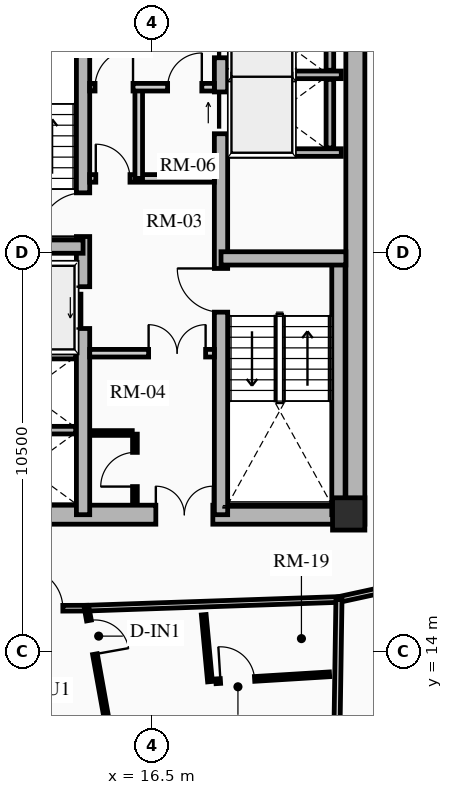
"""IFC4 building model, lengths in metres.
Left out: names, types, materials, properties, quantities, classifications, styles, units other than length and angle.
Written with IfcOpenShell. Run it as: python <this file> out.ifc"""

import sys

from ifc_helpers import new_model, si_unit, direction, frame, frame_2d, origin, origin_2d, place, context, subcontext, project, spatial, rectangle, extrude, source, transform, mapped, element, fill, save


model = new_model("IFC4")
c1 = context("Model", 3, precision=1e-05, world=origin(), true_north=direction((0.0, 1.0)))
c2 = subcontext(c1, "Body", "Model", "MODEL_VIEW")
j1 = project(units=[si_unit("LENGTHUNIT", "METRE"), si_unit("PLANEANGLEUNIT", "RADIAN")], contexts=[c1])
p1 = place(None, origin())
s1 = spatial("IfcSite", under=j1, at=p1, CompositionType="ELEMENT")
p2 = place(p1, origin())
s2 = spatial("IfcBuilding", under=s1, at=p2, CompositionType="ELEMENT")
p3 = place(p2, frame((0.0, 0.0, 42.37)))
s3 = spatial("IfcBuildingStorey", under=s2, at=p3, CompositionType="ELEMENT", Elevation=42.37)
p4 = place(p3, frame((21.85, 17.35, 0.0), z_axis=(0.0, 0.0, 1.0), x_axis=(0.0, 1.0, 0.0)))
e1 = element("IfcWall", 1, at=p4, inside=s3, PredefinedType="SHEAR", context=c2, shape_type="SweptSolid", body=[
    extrude(rectangle(XDim=14.3, YDim=0.5, at=frame_2d((7.15, 0.0))), origin(), (0.0, 0.0, 1.0), 2.91),
])
p5 = place(p3, frame((11.15, 17.6, 0.0), z_axis=(0.0, 0.0, 1.0), x_axis=(1.0, 0.0, 0.0)))
e2 = element("IfcWall", 2, at=p5, inside=s3, PredefinedType="SHEAR", context=c2, shape_type="SweptSolid", body=[
    extrude(rectangle(XDim=10.7, YDim=0.5, at=frame_2d((5.35, 0.0))), origin(), (0.0, 0.0, 1.0), 2.91),
])
m1 = source(origin(), c2, "Body", "SweptSolid", [
    extrude(rectangle(XDim=1.5, YDim=2.02, at=frame_2d((0.75, 1.01))), frame((0.0, 0.26, 0.0), z_axis=(0.0, -1.0, 0.0), x_axis=(1.0, 0.0, 0.0)), (0.0, 0.0, 1.0), 0.52),
])
p6 = place(p5, frame((5.45, 0.0, 0.0)))
e3 = element("IfcOpeningElement", 3, at=p6, cuts=e2, PredefinedType="OPENING", context=c2, shape_type="MappedRepresentation", body=[
    mapped(m1, transform((0.0, 0.0, 0.0), x_axis=(1.0, 0.0, 0.0), y_axis=(0.0, 1.0, 0.0), z_axis=(0.0, 0.0, 1.0), scale=1.0)),
])
p7 = place(p3, frame((14.685, 17.6, 0.0), z_axis=(0.0, 0.0, 1.0), x_axis=(0.0, 1.0, 0.0)))
e4 = element("IfcWall", 4, at=p7, inside=s3, PredefinedType="SHEAR", context=c2, shape_type="SweptSolid", body=[
    extrude(rectangle(XDim=13.8, YDim=0.35, at=frame_2d((6.9, 0.0))), origin(), (0.0, 0.0, 1.0), 2.91),
])
m2 = source(origin(), c2, "Body", "SweptSolid", [
    extrude(rectangle(XDim=1.1, YDim=2.015, at=frame_2d((0.55, 1.007))), frame((0.0, 0.185, 0.0), z_axis=(0.0, -1.0, 0.0), x_axis=(1.0, 0.0, 0.0)), (0.0, 0.0, 1.0), 0.37),
])
p8 = place(p7, frame((4.9, 0.0, 0.0)))
e5 = element("IfcOpeningElement", 5, at=p8, cuts=e4, PredefinedType="OPENING", context=c2, shape_type="MappedRepresentation", body=[
    mapped(m2, transform((0.0, 0.0, 0.0), x_axis=(1.0, 0.0, 0.0), y_axis=(0.0, 1.0, 0.0), z_axis=(0.0, 0.0, 1.0), scale=1.0)),
])
m3 = source(origin(), c2, "Body", "SweptSolid", [
    extrude(rectangle(XDim=1.15, YDim=2.02, at=frame_2d((0.575, 1.01))), frame((0.0, 0.185, 0.0), z_axis=(0.0, -1.0, 0.0), x_axis=(1.0, 0.0, 0.0)), (0.0, 0.0, 1.0), 0.37),
])
p9 = place(p7, frame((7.32, 0.0, 0.0)))
e6 = element("IfcOpeningElement", 6, at=p9, cuts=e4, PredefinedType="OPENING", context=c2, shape_type="MappedRepresentation", body=[
    mapped(m3, transform((0.0, 0.0, 0.0), x_axis=(1.0, 0.0, 0.0), y_axis=(0.0, 1.0, 0.0), z_axis=(0.0, 0.0, 1.0), scale=1.0)),
])
p10 = place(p3, frame((18.315, 17.6, 0.0), z_axis=(0.0, 0.0, 1.0), x_axis=(0.0, 1.0, 0.0)))
e7 = element("IfcWall", 7, at=p10, inside=s3, PredefinedType="SHEAR", context=c2, shape_type="SweptSolid", body=[
    extrude(rectangle(XDim=13.8, YDim=0.35, at=frame_2d((6.9, 0.0))), origin(), (0.0, 0.0, 1.0), 2.91),
])
p11 = place(p10, frame((10.025, 0.0, 0.0)))
e8 = element("IfcOpeningElement", 8, at=p11, cuts=e7, PredefinedType="OPENING", context=c2, shape_type="MappedRepresentation", body=[
    mapped(m2, transform((0.0, 0.0, 0.0), x_axis=(1.0, 0.0, 0.0), y_axis=(0.0, 1.0, 0.0), z_axis=(0.0, 0.0, 1.0), scale=1.0)),
])
p12 = place(p10, frame((12.025, 0.0, 0.0)))
e9 = element("IfcOpeningElement", 9, at=p12, cuts=e7, PredefinedType="OPENING", context=c2, shape_type="MappedRepresentation", body=[
    mapped(m2, transform((0.0, 0.0, 0.0), x_axis=(1.0, 0.0, 0.0), y_axis=(0.0, 1.0, 0.0), z_axis=(0.0, 0.0, 1.0), scale=1.0)),
])
p13 = place(p10, frame((5.33, 0.0, 0.0)))
e10 = element("IfcOpeningElement", 10, at=p13, cuts=e7, PredefinedType="OPENING", context=c2, shape_type="MappedRepresentation", body=[
    mapped(m3, transform((0.0, 0.0, 0.0), x_axis=(1.0, 0.0, 0.0), y_axis=(0.0, 1.0, 0.0), z_axis=(0.0, 0.0, 1.0), scale=1.0)),
])
p14 = place(p3, frame((11.4, 24.655, 0.0), z_axis=(0.0, 0.0, 1.0), x_axis=(1.0, 0.0, 0.0)))
e11 = element("IfcWall", 11, at=p14, inside=s3, PredefinedType="SHEAR", context=c2, shape_type="SweptSolid", body=[
    extrude(rectangle(XDim=3.285, YDim=0.35, at=frame_2d((1.643, 0.0))), origin(), (0.0, 0.0, 1.0), 2.91),
])
p15 = place(p3, frame((21.405, 17.6, 0.0), z_axis=(0.0, 0.0, 1.0), x_axis=(0.0, 1.0, 0.0)))
e12 = element("IfcWall", 12, at=p15, inside=s3, PredefinedType="SHEAR", context=c2, shape_type="SweptSolid", body=[
    extrude(rectangle(XDim=6.745, YDim=0.35, at=frame_2d((3.373, 0.0))), origin(), (0.0, 0.0, 1.0), 2.91),
])
p16 = place(p3, frame((18.315, 24.345, 0.0), z_axis=(0.0, 0.0, 1.0), x_axis=(1.0, 0.0, 0.0)))
e13 = element("IfcWall", 13, at=p16, inside=s3, PredefinedType="SHEAR", context=c2, shape_type="SweptSolid", body=[
    extrude(rectangle(XDim=3.285, YDim=0.35, at=frame_2d((1.643, 0.0))), origin(), (0.0, 0.0, 1.0), 2.91),
])
p17 = place(p3, frame((21.675, 17.62, 0.0), z_axis=(0.0, 0.0, 1.0), x_axis=(1.0, 0.0, 0.0)))
e14 = element("IfcColumn", 14, at=p17, inside=s3, PredefinedType="COLUMN", context=c2, shape_type="SweptSolid", body=[
    extrude(rectangle(XDim=0.85, YDim=0.85, at=origin_2d()), origin(), (0.0, 0.0, 1.0), 2.91),
])
for number, where, z_axis, x_axis in (
    (15, (11.52, 21.8, 0.0), (0.0, 0.0, 1.0), (1.0, 0.0, 0.0)),
    (16, (11.52, 19.825, 0.0), (0.0, 0.0, 1.0), (1.0, 0.0, 0.0)),
    (17, (18.51, 27.13, 0.0), (0.0, 0.0, 1.0), (1.0, 0.0, 0.0)),
    (18, (18.51, 29.175, 0.0), (0.0, 0.0, 1.0), (1.0, 0.0, 0.0)),
):
    element("IfcWall", number, at=place(p3, frame(where, z_axis=z_axis, x_axis=x_axis)), inside=s3, PredefinedType="SHEAR", context=c2, shape_type="SweptSolid", body=[
        extrude(rectangle(XDim=2.97, YDim=0.2, at=frame_2d((1.485, 0.0))), origin(), (0.0, 0.0, 1.0), 2.91),
    ])
p18 = place(p3, frame((21.18, 27.25, 0.0), z_axis=(0.0, 0.0, 1.0), x_axis=(0.0, 1.0, 0.0)))
e19 = element("IfcWall", 19, at=p18, inside=s3, PredefinedType="SHEAR", context=c2, shape_type="SweptSolid", body=[
    extrude(rectangle(XDim=1.805, YDim=0.2, at=frame_2d((0.902, 0.0))), origin(), (0.0, 0.0, 1.0), 2.91),
])
p19 = place(p3, frame((21.18, 29.295, 0.0), z_axis=(0.0, 0.0, 1.0), x_axis=(0.0, 1.0, 0.0)))
e20 = element("IfcWall", 20, at=p19, inside=s3, PredefinedType="SHEAR", context=c2, shape_type="SweptSolid", body=[
    extrude(rectangle(XDim=1.635, YDim=0.2, at=frame_2d((0.817, 0.0))), origin(), (0.0, 0.0, 1.0), 2.91),
])
p20 = place(p3, frame((14.86, 21.85, 0.0), z_axis=(0.0, 0.0, 1.0), x_axis=(1.0, 0.0, 0.0)))
e21 = element("IfcWall", 21, at=p20, inside=s3, PredefinedType="PARTITIONING", context=c2, shape_type="SweptSolid", body=[
    extrude(rectangle(XDim=3.28, YDim=0.2, at=frame_2d((1.64, 0.0))), origin(), (0.0, 0.0, 1.0), 2.635),
])
m4 = source(origin(), c2, "Body", "SweptSolid", [
    extrude(rectangle(XDim=1.5, YDim=2.02, at=frame_2d((0.75, 1.01))), frame((0.0, 0.11, 0.0), z_axis=(0.0, -1.0, 0.0), x_axis=(1.0, 0.0, 0.0)), (0.0, 0.0, 1.0), 0.22),
])
p21 = place(p20, frame((1.55, 0.0, 0.0)))
e22 = element("IfcOpeningElement", 22, at=p21, cuts=e21, PredefinedType="OPENING", context=c2, shape_type="MappedRepresentation", body=[
    mapped(m4, transform((0.0, 0.0, 0.0), x_axis=(1.0, 0.0, 0.0), y_axis=(0.0, 1.0, 0.0), z_axis=(0.0, 0.0, 1.0), scale=1.0)),
])
p22 = place(p3, frame((14.86, 26.45, 0.0), z_axis=(0.0, 0.0, 1.0), x_axis=(1.0, 0.0, 0.0)))
e23 = element("IfcWall", 23, at=p22, inside=s3, PredefinedType="PARTITIONING", context=c2, shape_type="SweptSolid", body=[
    extrude(rectangle(XDim=3.28, YDim=0.2, at=frame_2d((1.64, 0.0))), origin(), (0.0, 0.0, 1.0), 2.635),
])
m5 = source(origin(), c2, "Body", "SweptSolid", [
    extrude(rectangle(XDim=0.9, YDim=2.005, at=frame_2d((0.45, 1.002))), frame((0.0, 0.11, 0.0), z_axis=(0.0, -1.0, 0.0), x_axis=(1.0, 0.0, 0.0)), (0.0, 0.0, 1.0), 0.22),
])
p23 = place(p22, frame((0.16, 0.0, 0.0)))
e24 = element("IfcOpeningElement", 24, at=p23, cuts=e23, PredefinedType="OPENING", context=c2, shape_type="MappedRepresentation", body=[
    mapped(m5, transform((0.0, 0.0, 0.0), x_axis=(1.0, 0.0, 0.0), y_axis=(0.0, 1.0, 0.0), z_axis=(0.0, 0.0, 1.0), scale=1.0)),
])
p24 = place(p3, frame((16.15, 26.45, 0.0), z_axis=(0.0, 0.0, 1.0), x_axis=(0.0, 1.0, 0.0)))
e25 = element("IfcWall", 25, at=p24, inside=s3, PredefinedType="PARTITIONING", context=c2, shape_type="SweptSolid", body=[
    extrude(rectangle(XDim=2.4, YDim=0.2, at=frame_2d((1.2, 0.0))), origin(), (0.0, 0.0, 1.0), 2.635),
])
p25 = place(p3, frame((14.86, 28.85, 0.0), z_axis=(0.0, 0.0, 1.0), x_axis=(1.0, 0.0, 0.0)))
e26 = element("IfcWall", 26, at=p25, inside=s3, PredefinedType="PARTITIONING", context=c2, shape_type="SweptSolid", body=[
    extrude(rectangle(XDim=3.28, YDim=0.2, at=frame_2d((1.64, 0.0))), origin(), (0.0, 0.0, 1.0), 2.635),
])
m6 = source(origin(), c2, "Body", "SweptSolid", [
    extrude(rectangle(XDim=1.0, YDim=2.015, at=frame_2d((0.5, 1.007))), frame((0.0, 0.11, 0.0), z_axis=(0.0, -1.0, 0.0), x_axis=(1.0, 0.0, 0.0)), (0.0, 0.0, 1.0), 0.22),
])
p26 = place(p25, frame((0.14, 0.0, 0.0)))
e27 = element("IfcOpeningElement", 27, at=p26, cuts=e26, PredefinedType="OPENING", context=c2, shape_type="MappedRepresentation", body=[
    mapped(m6, transform((0.0, 0.0, 0.0), x_axis=(1.0, 0.0, 0.0), y_axis=(0.0, 1.0, 0.0), z_axis=(0.0, 0.0, 1.0), scale=1.0)),
])
p27 = place(p25, frame((2.05, 0.0, 0.0)))
e28 = element("IfcOpeningElement", 28, at=p27, cuts=e26, PredefinedType="OPENING", context=c2, shape_type="MappedRepresentation", body=[
    mapped(m5, transform((0.0, 0.0, 0.0), x_axis=(1.0, 0.0, 0.0), y_axis=(0.0, 1.0, 0.0), z_axis=(0.0, 0.0, 1.0), scale=1.0)),
])
p28 = place(p3, frame((16.05, 17.92, 0.0), z_axis=(0.0, 0.0, 1.0), x_axis=(0.0, 1.0, 0.0)))
e29 = element("IfcWall", 29, at=p28, inside=s3, PredefinedType="PARTITIONING", context=c2, shape_type="SweptSolid", body=[
    extrude(rectangle(XDim=1.8, YDim=0.125, at=frame_2d((0.9, 0.0))), origin(), (0.0, 0.0, 1.0), 2.635),
])
m7 = source(origin(), c2, "Body", "SweptSolid", [
    extrude(rectangle(XDim=0.9, YDim=2.005, at=frame_2d((0.45, 1.002))), frame((0.0, 0.073, 0.0), z_axis=(0.0, -1.0, 0.0), x_axis=(1.0, 0.0, 0.0)), (0.0, 0.0, 1.0), 0.145),
])
p29 = place(p28, frame((0.42, 0.0, 0.0)))
e30 = element("IfcOpeningElement", 30, at=p29, cuts=e29, PredefinedType="OPENING", context=c2, shape_type="MappedRepresentation", body=[
    mapped(m7, transform((0.0, 0.0, 0.0), x_axis=(1.0, 0.0, 0.0), y_axis=(0.0, 1.0, 0.0), z_axis=(0.0, 0.0, 1.0), scale=1.0)),
])
p30 = place(p3, frame((14.88, 19.75, 0.0), z_axis=(0.0, 0.0, 1.0), x_axis=(1.0, 0.0, 0.0)))
e31 = element("IfcWall", 31, at=p30, inside=s3, PredefinedType="PARTITIONING", context=c2, shape_type="SweptSolid", body=[
    extrude(rectangle(XDim=1.1, YDim=0.125, at=frame_2d((0.55, 0.0))), origin(), (0.0, 0.0, 1.0), 2.635),
])
p31 = place(p3, frame((11.46, 15.129, 0.0), z_axis=(0.0, 0.0, 1.0), x_axis=(0.999993513287, 0.003601858435, 0.0)))
e32 = element("IfcWall", 32, at=p31, inside=s3, PredefinedType="PARTITIONING", context=c2, shape_type="SweptSolid", body=[
    extrude(rectangle(XDim=3.321, YDim=0.15, at=frame_2d((1.661, 0.0))), origin(), (0.0, 0.0, 1.0), 2.159),
])
m8 = source(origin(), c2, "Body", "SweptSolid", [
    extrude(rectangle(XDim=1.05, YDim=2.015, at=frame_2d((0.525, 1.007))), frame((0.0, 0.085, 0.0), z_axis=(0.0, -1.0, 0.0), x_axis=(1.0, 0.0, 0.0)), (0.0, 0.0, 1.0), 0.17),
])
p32 = place(p31, frame((1.643, 0.0, 0.0)))
e33 = element("IfcOpeningElement", 33, at=p32, cuts=e32, PredefinedType="OPENING", context=c2, shape_type="MappedRepresentation", body=[
    mapped(m8, transform((0.0, 0.0, 0.0), x_axis=(1.0, 0.0, 0.0), y_axis=(0.0, 1.0, 0.0), z_axis=(0.0, 0.0, 1.0), scale=1.0)),
])
p33 = place(p3, frame((14.781, 15.141, 0.0), z_axis=(0.0, 0.0, 1.0), x_axis=(0.999407918707, 0.034406569513, 0.0)))
e34 = element("IfcWall", 34, at=p33, inside=s3, PredefinedType="PARTITIONING", context=c2, shape_type="SweptSolid", body=[
    extrude(rectangle(XDim=6.642, YDim=0.15, at=frame_2d((3.321, 0.0))), origin(), (0.0, 0.0, 1.0), 2.159),
])
p34 = place(p3, frame((21.419, 15.369, 0.0), z_axis=(0.0, 0.0, 1.0), x_axis=(0.977192701953, 0.212354475464, 0.0)))
e35 = element("IfcWall", 35, at=p34, inside=s3, PredefinedType="PARTITIONING", context=c2, shape_type="SweptSolid", body=[
    extrude(rectangle(XDim=1.888, YDim=0.15, at=frame_2d((0.944, 0.0))), origin(), (0.0, 0.0, 1.0), 2.205),
])
p35 = place(p3, frame((21.419, 15.369, 0.0), z_axis=(0.0, 0.0, 1.0), x_axis=(-0.015237110632, -0.999883908491, 0.0)))
e36 = element("IfcWall", 36, at=p35, inside=s3, PredefinedType="PARTITIONING", context=c2, shape_type="SweptSolid", body=[
    extrude(rectangle(XDim=8.893, YDim=0.16, at=frame_2d((4.446, 0.0))), origin(), (0.0, 0.0, 1.0), 2.073),
])
p36 = place(p3, frame((14.781, 15.141, 0.0), z_axis=(0.0, 0.0, 1.0), x_axis=(0.176426287524, -0.984313854962, 0.0)))
e37 = element("IfcWall", 37, at=p36, inside=s3, PredefinedType="PARTITIONING", context=c2, shape_type="SweptSolid", body=[
    extrude(rectangle(XDim=9.743, YDim=0.125, at=frame_2d((4.872, 0.0))), origin(), (0.0, 0.0, 1.0), 2.073),
])
p37 = place(p36, frame((0.33, 0.0, 0.0)))
e38 = element("IfcOpeningElement", 38, at=p37, cuts=e37, PredefinedType="OPENING", context=c2, shape_type="MappedRepresentation", body=[
    mapped(m7, transform((0.0, 0.0, 0.0), x_axis=(1.0, 0.0, 0.0), y_axis=(0.0, 1.0, 0.0), z_axis=(0.0, 0.0, 1.0), scale=1.0)),
])
p38 = place(p3, frame((17.86, 14.968, 0.0), z_axis=(0.0, 0.0, 1.0), x_axis=(0.093037102593, -0.995662642435, 0.0)))
e39 = element("IfcWall", 39, at=p38, inside=s3, PredefinedType="PARTITIONING", context=c2, shape_type="SweptSolid", body=[
    extrude(rectangle(XDim=1.769, YDim=0.125, at=frame_2d((0.884, 0.0))), origin(), (0.0, 0.0, 1.0), 2.635),
])
p39 = place(p3, frame((18.181, 13.216, 0.0), z_axis=(0.0, 0.0, 1.0), x_axis=(0.998120468621, 0.061282380177, 0.0)))
e40 = element("IfcWall", 40, at=p39, inside=s3, PredefinedType="PARTITIONING", context=c2, shape_type="SweptSolid", body=[
    extrude(rectangle(XDim=2.996, YDim=0.125, at=frame_2d((1.498, 0.0))), origin(), (0.0, 0.0, 1.0), 2.159),
])
p40 = place(p39, frame((0.12, 0.0, 0.0)))
e41 = element("IfcOpeningElement", 41, at=p40, cuts=e40, PredefinedType="OPENING", context=c2, shape_type="MappedRepresentation", body=[
    mapped(m7, transform((0.0, 0.0, 0.0), x_axis=(1.0, 0.0, 0.0), y_axis=(0.0, 1.0, 0.0), z_axis=(0.0, 0.0, 1.0), scale=1.0)),
])
m9 = source(origin(), c2, "Body", "SweptSolid", [
    extrude(rectangle(XDim=1.1, YDim=2.015, at=frame_2d((0.55, 1.007))), frame((0.0, 0.025, 0.0), z_axis=(0.0, -1.0, 0.0), x_axis=(1.0, 0.0, 0.0)), (0.0, 0.0, 1.0), 0.05),
])
p41 = place(p8, origin())
e42 = element("IfcDoor", 42, at=p41, inside=s3, OperationType="SLIDING_TO_LEFT", PredefinedType="DOOR", context=c2, shape_type="MappedRepresentation", body=[
    mapped(m9, transform((0.0, 0.0, 0.0), x_axis=(1.0, 0.0, 0.0), y_axis=(0.0, 1.0, 0.0), z_axis=(0.0, 0.0, 1.0), scale=1.0)),
])
fill(e5, e42)
p42 = place(p11, origin())
e43 = element("IfcDoor", 43, at=p42, inside=s3, OperationType="SLIDING_TO_RIGHT", PredefinedType="DOOR", context=c2, shape_type="MappedRepresentation", body=[
    mapped(m9, transform((0.0, 0.0, 0.0), x_axis=(1.0, 0.0, 0.0), y_axis=(0.0, 1.0, 0.0), z_axis=(0.0, 0.0, 1.0), scale=1.0)),
])
fill(e8, e43)
p43 = place(p12, origin())
e44 = element("IfcDoor", 44, at=p43, inside=s3, OperationType="SLIDING_TO_LEFT", PredefinedType="DOOR", context=c2, shape_type="MappedRepresentation", body=[
    mapped(m9, transform((0.0, 0.0, 0.0), x_axis=(1.0, 0.0, 0.0), y_axis=(0.0, 1.0, 0.0), z_axis=(0.0, 0.0, 1.0), scale=1.0)),
])
fill(e9, e44)
m10 = source(origin(), c2, "Body", "SweptSolid", [
    extrude(rectangle(XDim=1.15, YDim=2.02, at=frame_2d((0.575, 1.01))), frame((0.0, 0.025, 0.0), z_axis=(0.0, -1.0, 0.0), x_axis=(1.0, 0.0, 0.0)), (0.0, 0.0, 1.0), 0.05),
])
p44 = place(p9, origin())
e45 = element("IfcDoor", 45, at=p44, inside=s3, OperationType="SINGLE_SWING_LEFT", PredefinedType="DOOR", context=c2, shape_type="MappedRepresentation", body=[
    mapped(m10, transform((0.0, 0.0, 0.0), x_axis=(1.0, 0.0, 0.0), y_axis=(0.0, 1.0, 0.0), z_axis=(0.0, 0.0, 1.0), scale=1.0)),
])
fill(e6, e45)
p45 = place(p13, origin())
e46 = element("IfcDoor", 46, at=p45, inside=s3, OperationType="SINGLE_SWING_RIGHT", PredefinedType="DOOR", context=c2, shape_type="MappedRepresentation", body=[
    mapped(m10, transform((0.0, 0.0, 0.0), x_axis=(1.0, 0.0, 0.0), y_axis=(0.0, 1.0, 0.0), z_axis=(0.0, 0.0, 1.0), scale=1.0)),
])
fill(e10, e46)
m11 = source(origin(), c2, "Body", "SweptSolid", [
    extrude(rectangle(XDim=1.5, YDim=2.02, at=frame_2d((0.75, 1.01))), frame((0.0, 0.025, 0.0), z_axis=(0.0, -1.0, 0.0), x_axis=(1.0, 0.0, 0.0)), (0.0, 0.0, 1.0), 0.05),
])
p46 = place(p6, origin())
e47 = element("IfcDoor", 47, at=p46, inside=s3, OperationType="DOUBLE_DOOR_SINGLE_SWING", PredefinedType="DOOR", context=c2, shape_type="MappedRepresentation", body=[
    mapped(m11, transform((0.0, 0.0, 0.0), x_axis=(1.0, 0.0, 0.0), y_axis=(0.0, 1.0, 0.0), z_axis=(0.0, 0.0, 1.0), scale=1.0)),
])
fill(e3, e47)
p47 = place(p21, origin())
e48 = element("IfcDoor", 48, at=p47, inside=s3, OperationType="DOUBLE_DOOR_SINGLE_SWING", PredefinedType="DOOR", context=c2, shape_type="MappedRepresentation", body=[
    mapped(m11, transform((0.0, 0.0, 0.0), x_axis=(1.0, 0.0, 0.0), y_axis=(0.0, 1.0, 0.0), z_axis=(0.0, 0.0, 1.0), scale=1.0)),
])
fill(e22, e48)
m12 = source(origin(), c2, "Body", "SweptSolid", [
    extrude(rectangle(XDim=0.9, YDim=2.005, at=frame_2d((0.45, 1.002))), frame((0.0, 0.025, 0.0), z_axis=(0.0, -1.0, 0.0), x_axis=(1.0, 0.0, 0.0)), (0.0, 0.0, 1.0), 0.05),
])
p48 = place(p23, origin())
e49 = element("IfcDoor", 49, at=p48, inside=s3, OperationType="SINGLE_SWING_LEFT", PredefinedType="DOOR", context=c2, shape_type="MappedRepresentation", body=[
    mapped(m12, transform((0.0, 0.0, 0.0), x_axis=(1.0, 0.0, 0.0), y_axis=(0.0, 1.0, 0.0), z_axis=(0.0, 0.0, 1.0), scale=1.0)),
])
fill(e24, e49)
m13 = source(origin(), c2, "Body", "SweptSolid", [
    extrude(rectangle(XDim=1.0, YDim=2.015, at=frame_2d((0.5, 1.007))), frame((0.0, 0.025, 0.0), z_axis=(0.0, -1.0, 0.0), x_axis=(1.0, 0.0, 0.0)), (0.0, 0.0, 1.0), 0.05),
])
p49 = place(p26, origin())
e50 = element("IfcDoor", 50, at=p49, inside=s3, OperationType="SINGLE_SWING_RIGHT", PredefinedType="DOOR", context=c2, shape_type="MappedRepresentation", body=[
    mapped(m13, transform((0.0, 0.0, 0.0), x_axis=(1.0, 0.0, 0.0), y_axis=(0.0, 1.0, 0.0), z_axis=(0.0, 0.0, 1.0), scale=1.0)),
])
fill(e27, e50)
p50 = place(p29, origin())
e51 = element("IfcDoor", 51, at=p50, inside=s3, OperationType="SINGLE_SWING_LEFT", PredefinedType="DOOR", context=c2, shape_type="MappedRepresentation", body=[
    mapped(m12, transform((0.0, 0.0, 0.0), x_axis=(1.0, 0.0, 0.0), y_axis=(0.0, 1.0, 0.0), z_axis=(0.0, 0.0, 1.0), scale=1.0)),
])
fill(e30, e51)
p51 = place(p27, origin())
e52 = element("IfcDoor", 52, at=p51, inside=s3, OperationType="SINGLE_SWING_RIGHT", PredefinedType="DOOR", context=c2, shape_type="MappedRepresentation", body=[
    mapped(m12, transform((0.0, 0.0, 0.0), x_axis=(1.0, 0.0, 0.0), y_axis=(0.0, 1.0, 0.0), z_axis=(0.0, 0.0, 1.0), scale=1.0)),
])
fill(e28, e52)
m14 = source(origin(), c2, "Body", "SweptSolid", [
    extrude(rectangle(XDim=1.05, YDim=2.015, at=frame_2d((0.525, 1.007))), frame((0.0, 0.025, 0.0), z_axis=(0.0, -1.0, 0.0), x_axis=(1.0, 0.0, 0.0)), (0.0, 0.0, 1.0), 0.05),
])
p52 = place(p32, origin())
e53 = element("IfcDoor", 53, at=p52, inside=s3, OperationType="SINGLE_SWING_LEFT", PredefinedType="DOOR", context=c2, shape_type="MappedRepresentation", body=[
    mapped(m14, transform((0.0, 0.0, 0.0), x_axis=(1.0, 0.0, 0.0), y_axis=(0.0, 1.0, 0.0), z_axis=(0.0, 0.0, 1.0), scale=1.0)),
])
fill(e33, e53)
p53 = place(p37, origin())
e54 = element("IfcDoor", 54, at=p53, inside=s3, OperationType="SINGLE_SWING_RIGHT", PredefinedType="DOOR", context=c2, shape_type="MappedRepresentation", body=[
    mapped(m12, transform((0.0, 0.0, 0.0), x_axis=(1.0, 0.0, 0.0), y_axis=(0.0, 1.0, 0.0), z_axis=(0.0, 0.0, 1.0), scale=1.0)),
])
fill(e38, e54)
p54 = place(p40, origin())
e55 = element("IfcDoor", 55, at=p54, inside=s3, OperationType="SINGLE_SWING_LEFT", PredefinedType="DOOR", context=c2, shape_type="MappedRepresentation", body=[
    mapped(m12, transform((0.0, 0.0, 0.0), x_axis=(1.0, 0.0, 0.0), y_axis=(0.0, 1.0, 0.0), z_axis=(0.0, 0.0, 1.0), scale=1.0)),
])
fill(e41, e55)
save(model, sys.argv[1])
